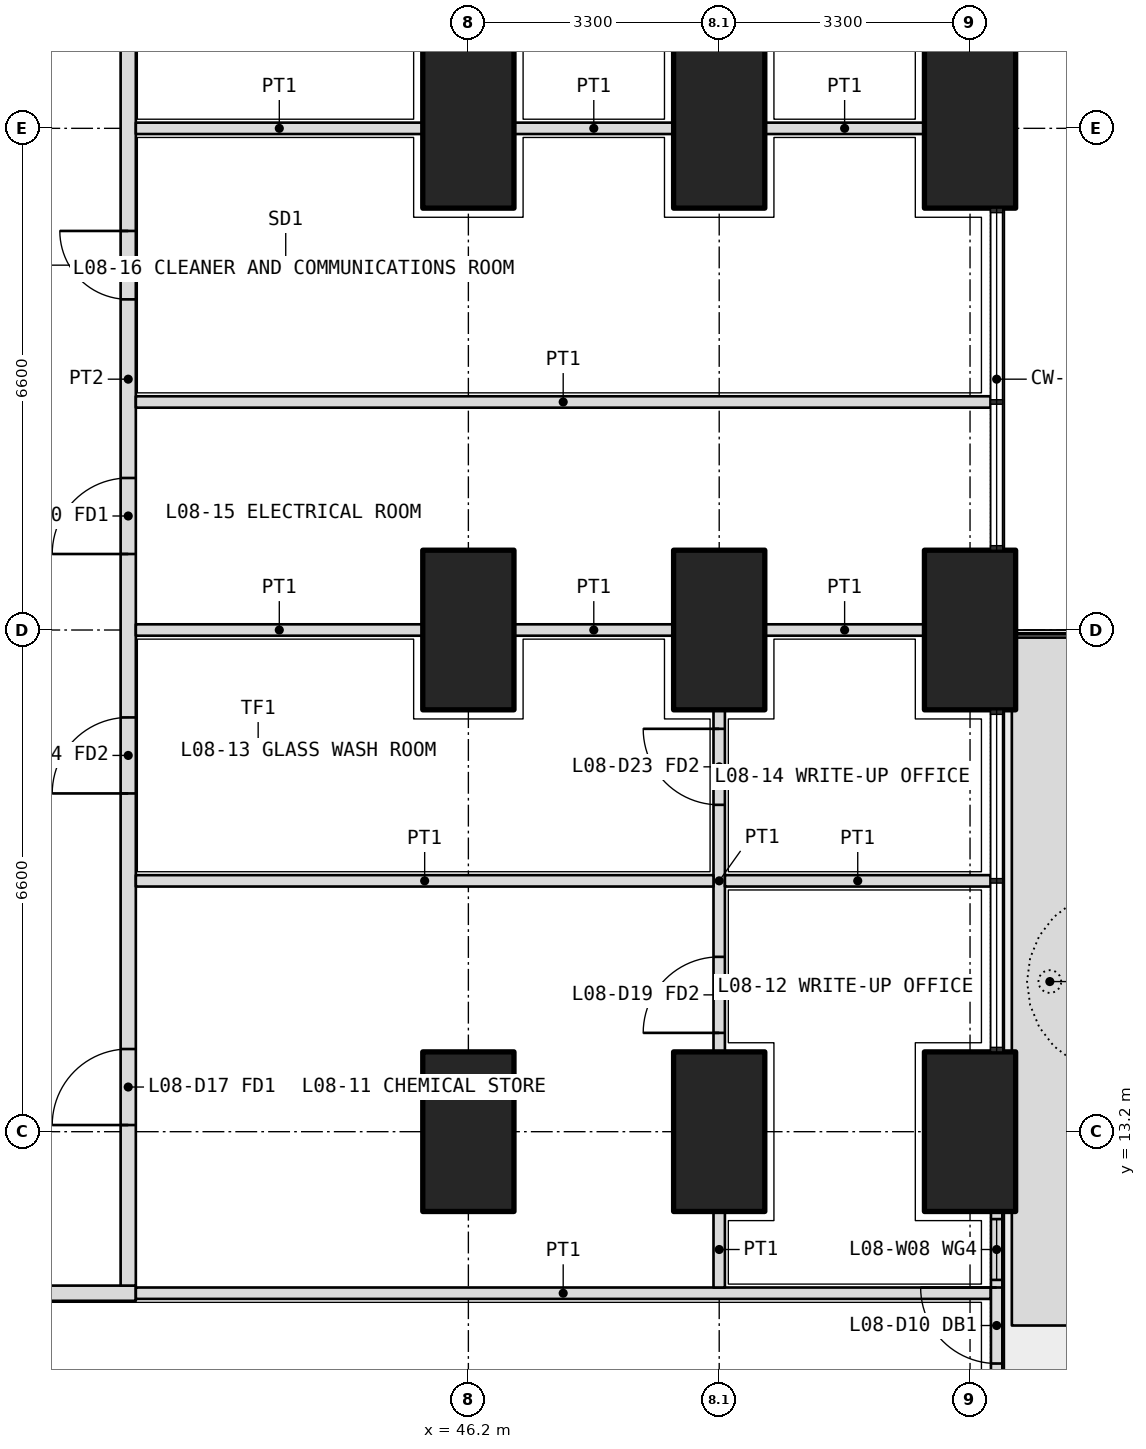
"""IFC4 building model, lengths in metres.
Left out: names, types, materials, properties, quantities, classifications, styles, units other than length and angle.
Written with IfcOpenShell. Run it as: python <this file> out.ifc"""

import sys

from ifc_helpers import new_model, si_unit, direction, frame, frame_2d, origin, origin_2d, place, context, subcontext, project, spatial, polyline, rectangle, outline, extrude, element, fill, save


model = new_model("IFC4")
c1 = context("Model", 3, precision=1e-05, world=origin(), true_north=direction((0.0, 1.0)))
c2 = subcontext(c1, "Body", "Model", "MODEL_VIEW")
j1 = project(units=[si_unit("LENGTHUNIT", "METRE"), si_unit("PLANEANGLEUNIT", "RADIAN")], contexts=[c1])
p1 = place(None, origin())
s1 = spatial("IfcSite", under=j1, at=p1, CompositionType="ELEMENT")
p2 = place(p1, origin())
s2 = spatial("IfcBuilding", under=s1, at=p2, CompositionType="ELEMENT")
p3 = place(p2, frame((0.0, 0.0, 38.1)))
s3 = spatial("IfcBuildingStorey", under=s2, at=p3, CompositionType="ELEMENT", Elevation=38.1)
for number, where, z_axis, x_axis in (
    (1, (52.8, 13.2, 0.0), (0.0, 0.0, 1.0), (0.0, 1.0, 0.0)),
    (2, (52.8, 19.8, 0.0), (0.0, 0.0, 1.0), (0.0, 1.0, 0.0)),
    (3, (52.8, 26.4, 0.0), (0.0, 0.0, 1.0), (0.0, 1.0, 0.0)),
    (4, (49.5, 13.2, 0.0), (0.0, 0.0, 1.0), (0.0, 1.0, 0.0)),
    (5, (49.5, 19.8, 0.0), (0.0, 0.0, 1.0), (0.0, 1.0, 0.0)),
    (6, (49.5, 26.4, 0.0), (0.0, 0.0, 1.0), (0.0, 1.0, 0.0)),
    (7, (46.2, 13.2, 0.0), (0.0, 0.0, 1.0), (0.0, 1.0, 0.0)),
    (8, (46.2, 19.8, 0.0), (0.0, 0.0, 1.0), (0.0, 1.0, 0.0)),
    (9, (46.2, 26.4, 0.0), (0.0, 0.0, 1.0), (0.0, 1.0, 0.0)),
):
    element("IfcColumn", number, at=place(p3, frame(where, z_axis=z_axis, x_axis=x_axis)), inside=s3, PredefinedType="COLUMN", context=c2, shape_type="SweptSolid", body=[
        extrude(rectangle(XDim=2.1, YDim=1.2, at=origin_2d()), origin(), (0.0, 0.0, 1.0), 4.2),
    ])
p4 = place(p3, origin())
e10 = element("IfcWall", 10, at=p4, inside=s3, PredefinedType="USERDEFINED", context=c2, shape_type="SweptSolid", body=[
    extrude(outline(polyline([(53.35, 10.65), (54.35, 10.65), (54.35, 19.7), (53.35, 19.7), (53.35, 10.65)]), holes=[polyline([(53.5, 10.8), (54.2, 10.8), (54.2, 19.55), (53.5, 19.55), (53.5, 10.8)])]), origin(), (0.0, 0.0, 1.0), 1.05),
])
p5 = place(p3, frame((53.15, 7.65, 0.0), z_axis=(0.0, 0.0, 1.0), x_axis=(0.0, 1.0, 0.0)))
e11 = element("IfcWall", 11, at=p5, inside=s3, PredefinedType="SOLIDWALL", context=c2, shape_type="SweptSolid", body=[
    extrude(rectangle(XDim=4.5, YDim=0.15, at=frame_2d((2.25, 0.0))), origin(), (0.0, 0.0, 1.0), 2.7),
])
p6 = place(p5, frame((2.5, 0.0, 0.0)))
e12 = element("IfcOpeningElement", 12, at=p6, cuts=e11, PredefinedType="OPENING", context=c2, shape_type="SweptSolid", body=[
    extrude(rectangle(XDim=1.0, YDim=2.4, at=frame_2d((0.5, 1.2))), frame((0.0, 0.085, 0.0), z_axis=(0.0, -1.0, 0.0), x_axis=(1.0, 0.0, 0.0)), (0.0, 0.0, 1.0), 0.17),
])
p7 = place(p5, frame((0.1, 0.0, 0.1)))
e13 = element("IfcOpeningElement", 13, at=p7, cuts=e11, PredefinedType="OPENING", context=c2, shape_type="SweptSolid", body=[
    extrude(rectangle(XDim=1.9, YDim=2.3, at=frame_2d((0.95, 1.15))), frame((0.0, 0.085, 0.0), z_axis=(0.0, -1.0, 0.0), x_axis=(1.0, 0.0, 0.0)), (0.0, 0.0, 1.0), 0.17),
])
p8 = place(p5, frame((3.6, 0.0, 0.1)))
e14 = element("IfcOpeningElement", 14, at=p8, cuts=e11, PredefinedType="OPENING", context=c2, shape_type="SweptSolid", body=[
    extrude(rectangle(XDim=0.8, YDim=2.3, at=frame_2d((0.4, 1.15))), frame((0.0, 0.085, 0.0), z_axis=(0.0, -1.0, 0.0), x_axis=(1.0, 0.0, 0.0)), (0.0, 0.0, 1.0), 0.17),
])
p9 = place(p3, frame((10.975, 11.075, 0.0), z_axis=(0.0, 0.0, 1.0), x_axis=(1.0, 0.0, 0.0)))
e15 = element("IfcWall", 15, at=p9, inside=s3, PredefinedType="PARTITIONING", context=c2, shape_type="SweptSolid", body=[
    extrude(rectangle(XDim=30.85, YDim=0.2, at=frame_2d((15.425, 0.0))), origin(), (0.0, 0.0, 1.0), 2.85),
])
p10 = place(p9, frame((2.312, 0.0, 0.0)))
e16 = element("IfcOpeningElement", 16, at=p10, cuts=e15, PredefinedType="OPENING", context=c2, shape_type="SweptSolid", body=[
    extrude(rectangle(XDim=1.0, YDim=2.1, at=frame_2d((0.5, 1.05))), frame((0.0, 0.11, 0.0), z_axis=(0.0, -1.0, 0.0), x_axis=(1.0, 0.0, 0.0)), (0.0, 0.0, 1.0), 0.22),
])
p11 = place(p9, frame((8.325, 0.0, 0.0)))
e17 = element("IfcOpeningElement", 17, at=p11, cuts=e15, PredefinedType="OPENING", context=c2, shape_type="SweptSolid", body=[
    extrude(rectangle(XDim=1.0, YDim=2.1, at=frame_2d((0.5, 1.05))), frame((0.0, 0.11, 0.0), z_axis=(0.0, -1.0, 0.0), x_axis=(1.0, 0.0, 0.0)), (0.0, 0.0, 1.0), 0.22),
])
p12 = place(p9, frame((13.175, 0.0, 0.0)))
e18 = element("IfcOpeningElement", 18, at=p12, cuts=e15, PredefinedType="OPENING", context=c2, shape_type="SweptSolid", body=[
    extrude(rectangle(XDim=1.2, YDim=2.1, at=frame_2d((0.6, 1.05))), frame((0.0, 0.11, 0.0), z_axis=(0.0, -1.0, 0.0), x_axis=(1.0, 0.0, 0.0)), (0.0, 0.0, 1.0), 0.22),
])
p13 = place(p9, frame((19.875, 0.0, 0.0)))
e19 = element("IfcOpeningElement", 19, at=p13, cuts=e15, PredefinedType="OPENING", context=c2, shape_type="SweptSolid", body=[
    extrude(rectangle(XDim=1.0, YDim=2.1, at=frame_2d((0.5, 1.05))), frame((0.0, 0.11, 0.0), z_axis=(0.0, -1.0, 0.0), x_axis=(1.0, 0.0, 0.0)), (0.0, 0.0, 1.0), 0.22),
])
p14 = place(p9, frame((27.538, 0.0, 0.0)))
e20 = element("IfcOpeningElement", 20, at=p14, cuts=e15, PredefinedType="OPENING", context=c2, shape_type="SweptSolid", body=[
    extrude(rectangle(XDim=1.0, YDim=2.1, at=frame_2d((0.5, 1.05))), frame((0.0, 0.11, 0.0), z_axis=(0.0, -1.0, 0.0), x_axis=(1.0, 0.0, 0.0)), (0.0, 0.0, 1.0), 0.22),
])
p15 = place(p3, frame((41.725, 11.175, 0.0), z_axis=(0.0, 0.0, 1.0), x_axis=(0.0, 1.0, 0.0)))
e21 = element("IfcWall", 21, at=p15, inside=s3, PredefinedType="PARTITIONING", context=c2, shape_type="SweptSolid", body=[
    extrude(rectangle(XDim=23.85, YDim=0.2, at=frame_2d((11.925, 0.0))), origin(), (0.0, 0.0, 1.0), 2.85),
])
p16 = place(p15, frame((2.113, 0.0, 0.0)))
e22 = element("IfcOpeningElement", 22, at=p16, cuts=e21, PredefinedType="OPENING", context=c2, shape_type="SweptSolid", body=[
    extrude(rectangle(XDim=1.0, YDim=2.1, at=frame_2d((0.5, 1.05))), frame((0.0, 0.11, 0.0), z_axis=(0.0, -1.0, 0.0), x_axis=(1.0, 0.0, 0.0)), (0.0, 0.0, 1.0), 0.22),
])
p17 = place(p15, frame((6.475, 0.0, 0.0)))
e23 = element("IfcOpeningElement", 23, at=p17, cuts=e21, PredefinedType="OPENING", context=c2, shape_type="SweptSolid", body=[
    extrude(rectangle(XDim=1.0, YDim=2.1, at=frame_2d((0.5, 1.05))), frame((0.0, 0.11, 0.0), z_axis=(0.0, -1.0, 0.0), x_axis=(1.0, 0.0, 0.0)), (0.0, 0.0, 1.0), 0.22),
])
p18 = place(p15, frame((9.625, 0.0, 0.0)))
e24 = element("IfcOpeningElement", 24, at=p18, cuts=e21, PredefinedType="OPENING", context=c2, shape_type="SweptSolid", body=[
    extrude(rectangle(XDim=1.0, YDim=2.1, at=frame_2d((0.5, 1.05))), frame((0.0, 0.11, 0.0), z_axis=(0.0, -1.0, 0.0), x_axis=(1.0, 0.0, 0.0)), (0.0, 0.0, 1.0), 0.22),
])
p19 = place(p15, frame((12.975, 0.0, 0.0)))
e25 = element("IfcOpeningElement", 25, at=p19, cuts=e21, PredefinedType="OPENING", context=c2, shape_type="SweptSolid", body=[
    extrude(rectangle(XDim=0.9, YDim=2.1, at=frame_2d((0.45, 1.05))), frame((0.0, 0.11, 0.0), z_axis=(0.0, -1.0, 0.0), x_axis=(1.0, 0.0, 0.0)), (0.0, 0.0, 1.0), 0.22),
])
p20 = place(p15, frame((19.087, 0.0, 0.0)))
e26 = element("IfcOpeningElement", 26, at=p20, cuts=e21, PredefinedType="OPENING", context=c2, shape_type="SweptSolid", body=[
    extrude(rectangle(XDim=1.0, YDim=2.1, at=frame_2d((0.5, 1.05))), frame((0.0, 0.11, 0.0), z_axis=(0.0, -1.0, 0.0), x_axis=(1.0, 0.0, 0.0)), (0.0, 0.0, 1.0), 0.22),
])
p21 = place(p3, frame((53.07, 11.075, 0.0), z_axis=(0.0, 0.0, 1.0), x_axis=(-1.0, 0.0, 0.0)))
e27 = element("IfcWall", 27, at=p21, inside=s3, PredefinedType="PARTITIONING", context=c2, shape_type="SweptSolid", body=[
    extrude(rectangle(XDim=11.245, YDim=0.15, at=frame_2d((5.623, 0.0))), origin(), (0.0, 0.0, 1.0), 2.7),
])
p22 = place(p3, frame((49.5, 11.15, 0.0), z_axis=(0.0, 0.0, 1.0), x_axis=(0.0, 1.0, 0.0)))
e28 = element("IfcWall", 28, at=p22, inside=s3, PredefinedType="PARTITIONING", context=c2, shape_type="SweptSolid", body=[
    extrude(rectangle(XDim=1.0, YDim=0.15, at=frame_2d((0.5, 0.0))), origin(), (0.0, 0.0, 1.0), 3.9),
])
p23 = place(p3, frame((49.5, 14.25, 0.0), z_axis=(0.0, 0.0, 1.0), x_axis=(0.0, 1.0, 0.0)))
e29 = element("IfcWall", 29, at=p23, inside=s3, PredefinedType="PARTITIONING", context=c2, shape_type="SweptSolid", body=[
    extrude(rectangle(XDim=4.5, YDim=0.15, at=frame_2d((2.25, 0.0))), origin(), (0.0, 0.0, 1.0), 3.9),
])
p24 = place(p23, frame((0.25, 0.0, 0.0)))
e30 = element("IfcOpeningElement", 30, at=p24, cuts=e29, PredefinedType="OPENING", context=c2, shape_type="SweptSolid", body=[
    extrude(rectangle(XDim=1.0, YDim=2.1, at=frame_2d((0.5, 1.05))), frame((0.0, 0.085, 0.0), z_axis=(0.0, -1.0, 0.0), x_axis=(1.0, 0.0, 0.0)), (0.0, 0.0, 1.0), 0.17),
])
p25 = place(p23, frame((3.25, 0.0, 0.0)))
e31 = element("IfcOpeningElement", 31, at=p25, cuts=e29, PredefinedType="OPENING", context=c2, shape_type="SweptSolid", body=[
    extrude(rectangle(XDim=1.0, YDim=2.1, at=frame_2d((0.5, 1.05))), frame((0.0, 0.085, 0.0), z_axis=(0.0, -1.0, 0.0), x_axis=(1.0, 0.0, 0.0)), (0.0, 0.0, 1.0), 0.17),
])
p26 = place(p3, frame((53.07, 22.8, 0.0), z_axis=(0.0, 0.0, 1.0), x_axis=(-1.0, 0.0, 0.0)))
e32 = element("IfcWall", 32, at=p26, inside=s3, PredefinedType="PARTITIONING", context=c2, shape_type="SweptSolid", body=[
    extrude(rectangle(XDim=11.245, YDim=0.15, at=frame_2d((5.623, 0.0))), origin(), (0.0, 0.0, 1.0), 2.7),
])
for number, where, z_axis, x_axis in (
    (33, (52.2, 26.4, 0.0), (0.0, 0.0, 1.0), (-1.0, 0.0, 0.0)),
    (34, (48.9, 26.4, 0.0), (0.0, 0.0, 1.0), (-1.0, 0.0, 0.0)),
):
    element("IfcWall", number, at=place(p3, frame(where, z_axis=z_axis, x_axis=x_axis)), inside=s3, PredefinedType="PARTITIONING", context=c2, shape_type="SweptSolid", body=[
        extrude(rectangle(XDim=2.1, YDim=0.15, at=frame_2d((1.05, 0.0))), origin(), (0.0, 0.0, 1.0), 2.85),
    ])
p27 = place(p3, frame((45.6, 26.4, 0.0), z_axis=(0.0, 0.0, 1.0), x_axis=(-1.0, 0.0, 0.0)))
e35 = element("IfcWall", 35, at=p27, inside=s3, PredefinedType="PARTITIONING", context=c2, shape_type="SweptSolid", body=[
    extrude(rectangle(XDim=3.775, YDim=0.15, at=frame_2d((1.888, 0.0))), origin(), (0.0, 0.0, 1.0), 2.85),
])
p28 = place(p3, frame((53.07, 16.5, 0.0), z_axis=(0.0, 0.0, 1.0), x_axis=(-1.0, 0.0, 0.0)))
e36 = element("IfcWall", 36, at=p28, inside=s3, PredefinedType="PARTITIONING", context=c2, shape_type="SweptSolid", body=[
    extrude(rectangle(XDim=3.495, YDim=0.15, at=frame_2d((1.748, 0.0))), origin(), (0.0, 0.0, 1.0), 2.7),
])
p29 = place(p3, frame((49.425, 16.5, 0.0), z_axis=(0.0, 0.0, 1.0), x_axis=(-1.0, 0.0, 0.0)))
e37 = element("IfcWall", 37, at=p29, inside=s3, PredefinedType="PARTITIONING", context=c2, shape_type="SweptSolid", body=[
    extrude(rectangle(XDim=7.6, YDim=0.15, at=frame_2d((3.8, 0.0))), origin(), (0.0, 0.0, 1.0), 3.9),
])
for number, where, z_axis, x_axis in (
    (38, (52.2, 19.8, 0.0), (0.0, 0.0, 1.0), (-1.0, 0.0, 0.0)),
    (39, (48.9, 19.8, 0.0), (0.0, 0.0, 1.0), (-1.0, 0.0, 0.0)),
):
    element("IfcWall", number, at=place(p3, frame(where, z_axis=z_axis, x_axis=x_axis)), inside=s3, PredefinedType="PARTITIONING", context=c2, shape_type="SweptSolid", body=[
        extrude(rectangle(XDim=2.1, YDim=0.15, at=frame_2d((1.05, 0.0))), origin(), (0.0, 0.0, 1.0), 2.85),
    ])
p30 = place(p3, frame((45.6, 19.8, 0.0), z_axis=(0.0, 0.0, 1.0), x_axis=(-1.0, 0.0, 0.0)))
e40 = element("IfcWall", 40, at=p30, inside=s3, PredefinedType="PARTITIONING", context=c2, shape_type="SweptSolid", body=[
    extrude(rectangle(XDim=3.775, YDim=0.15, at=frame_2d((1.888, 0.0))), origin(), (0.0, 0.0, 1.0), 2.85),
])
p31 = place(p6, origin())
e41 = element("IfcDoor", 41, at=p31, inside=s3, OperationType="SINGLE_SWING_RIGHT", PredefinedType="DOOR", context=c2, shape_type="SweptSolid", body=[
    extrude(rectangle(XDim=1.0, YDim=2.4, at=frame_2d((0.5, 1.2))), frame((0.0, 0.025, 0.0), z_axis=(0.0, -1.0, 0.0), x_axis=(1.0, 0.0, 0.0)), (0.0, 0.0, 1.0), 0.05),
])
fill(e12, e41)
p32 = place(p8, origin())
e42 = element("IfcWindow", 42, at=p32, inside=s3, PartitioningType="SINGLE_PANEL", PredefinedType="WINDOW", context=c2, shape_type="SweptSolid", body=[
    extrude(rectangle(XDim=0.8, YDim=2.3, at=frame_2d((0.4, 1.15))), frame((0.0, 0.03, 0.0), z_axis=(0.0, -1.0, 0.0), x_axis=(1.0, 0.0, 0.0)), (0.0, 0.0, 1.0), 0.06),
])
fill(e14, e42)
p33 = place(p16, origin())
e43 = element("IfcDoor", 43, at=p33, inside=s3, OperationType="SINGLE_SWING_LEFT", PredefinedType="DOOR", context=c2, shape_type="SweptSolid", body=[
    extrude(rectangle(XDim=1.0, YDim=2.1, at=frame_2d((0.5, 1.05))), frame((0.0, 0.025, 0.0), z_axis=(0.0, -1.0, 0.0), x_axis=(1.0, 0.0, 0.0)), (0.0, 0.0, 1.0), 0.05),
])
fill(e22, e43)
p34 = place(p24, origin())
e44 = element("IfcDoor", 44, at=p34, inside=s3, OperationType="SINGLE_SWING_LEFT", PredefinedType="DOOR", context=c2, shape_type="SweptSolid", body=[
    extrude(rectangle(XDim=1.0, YDim=2.1, at=frame_2d((0.5, 1.05))), frame((0.0, 0.025, 0.0), z_axis=(0.0, -1.0, 0.0), x_axis=(1.0, 0.0, 0.0)), (0.0, 0.0, 1.0), 0.05),
])
fill(e30, e44)
p35 = place(p17, origin())
e45 = element("IfcDoor", 45, at=p35, inside=s3, OperationType="SINGLE_SWING_LEFT", PredefinedType="DOOR", context=c2, shape_type="SweptSolid", body=[
    extrude(rectangle(XDim=1.0, YDim=2.1, at=frame_2d((0.5, 1.05))), frame((0.0, 0.025, 0.0), z_axis=(0.0, -1.0, 0.0), x_axis=(1.0, 0.0, 0.0)), (0.0, 0.0, 1.0), 0.05),
])
fill(e23, e45)
p36 = place(p25, origin())
e46 = element("IfcDoor", 46, at=p36, inside=s3, OperationType="SINGLE_SWING_RIGHT", PredefinedType="DOOR", context=c2, shape_type="SweptSolid", body=[
    extrude(rectangle(XDim=1.0, YDim=2.1, at=frame_2d((0.5, 1.05))), frame((0.0, 0.025, 0.0), z_axis=(0.0, -1.0, 0.0), x_axis=(1.0, 0.0, 0.0)), (0.0, 0.0, 1.0), 0.05),
])
fill(e31, e46)
p37 = place(p18, origin())
e47 = element("IfcDoor", 47, at=p37, inside=s3, OperationType="SINGLE_SWING_LEFT", PredefinedType="DOOR", context=c2, shape_type="SweptSolid", body=[
    extrude(rectangle(XDim=1.0, YDim=2.1, at=frame_2d((0.5, 1.05))), frame((0.0, 0.025, 0.0), z_axis=(0.0, -1.0, 0.0), x_axis=(1.0, 0.0, 0.0)), (0.0, 0.0, 1.0), 0.05),
])
fill(e24, e47)
p38 = place(p19, origin())
e48 = element("IfcDoor", 48, at=p38, inside=s3, OperationType="SINGLE_SWING_RIGHT", PredefinedType="DOOR", context=c2, shape_type="SweptSolid", body=[
    extrude(rectangle(XDim=0.9, YDim=2.1, at=frame_2d((0.45, 1.05))), frame((0.0, 0.025, 0.0), z_axis=(0.0, -1.0, 0.0), x_axis=(1.0, 0.0, 0.0)), (0.0, 0.0, 1.0), 0.05),
])
fill(e25, e48)
save(model, sys.argv[1])
